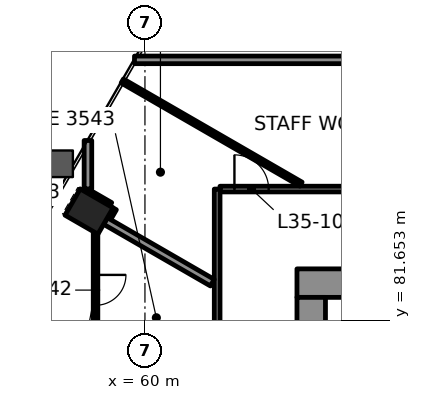
"""IFC4 building model, lengths in metres.
Left out: names, types, materials, properties, quantities, classifications, styles, units other than length and angle.
Written with IfcOpenShell. Run it as: python <this file> out.ifc"""

import sys

from ifc_helpers import new_model, si_unit, direction, frame, frame_2d, origin, origin_2d, place, context, subcontext, project, spatial, rectangle, hollow_rectangle, extrude, element, fill, save


model = new_model("IFC4")
c1 = context("Model", 3, precision=1e-05, world=origin(), true_north=direction((0.0, 1.0)))
c2 = subcontext(c1, "Body", "Model", "MODEL_VIEW")
j1 = project(units=[si_unit("LENGTHUNIT", "METRE"), si_unit("PLANEANGLEUNIT", "RADIAN")], contexts=[c1])
p1 = place(None, origin())
s1 = spatial("IfcSite", under=j1, at=p1, CompositionType="ELEMENT")
p2 = place(p1, origin())
s2 = spatial("IfcBuilding", under=s1, at=p2, CompositionType="ELEMENT")
p3 = place(p2, frame((0.0, 0.0, 155.8)))
s3 = spatial("IfcBuildingStorey", under=s2, at=p3, CompositionType="ELEMENT", Elevation=155.8)
p4 = place(p3, frame((58.53, 84.509, -0.0), z_axis=(0.0, 0.0, 1.0), x_axis=(-0.5, -0.866025403784, 0.0)))
e1 = element("IfcColumn", 1, at=p4, inside=s3, PredefinedType="COLUMN", context=c2, shape_type="SweptSolid", body=[
    extrude(hollow_rectangle(XDim=0.8, YDim=1.0, WallThickness=0.05, at=origin_2d()), origin(), (0.0, 0.0, 1.0), 3.9),
])
p5 = place(p3, frame((64.0, 82.625, 0.0), z_axis=(0.0, 0.0, 1.0), x_axis=(1.0, 0.0, 0.0)))
e2 = element("IfcWall", 2, at=p5, inside=s3, PredefinedType="SHEAR", context=c2, shape_type="SweptSolid", body=[
    extrude(rectangle(XDim=22.0, YDim=0.75, at=frame_2d((11.0, 0.0))), origin(), (0.0, 0.0, 1.0), 3.7),
])
p6 = place(p5, frame((3.695, 0.0, 0.0)))
e3 = element("IfcOpeningElement", 3, at=p6, cuts=e2, PredefinedType="OPENING", context=c2, shape_type="SweptSolid", body=[
    extrude(rectangle(XDim=1.0, YDim=2.1, at=frame_2d((0.5, 1.05))), frame((0.0, 0.385, 0.0), z_axis=(0.0, -1.0, 0.0), x_axis=(1.0, 0.0, 0.0)), (0.0, 0.0, 1.0), 0.77),
])
p7 = place(p5, frame((17.505, 0.0, 0.0)))
e4 = element("IfcOpeningElement", 4, at=p7, cuts=e2, PredefinedType="OPENING", context=c2, shape_type="SweptSolid", body=[
    extrude(rectangle(XDim=1.0, YDim=2.1, at=frame_2d((0.5, 1.05))), frame((0.0, 0.385, 0.0), z_axis=(0.0, -1.0, 0.0), x_axis=(1.0, 0.0, 0.0)), (0.0, 0.0, 1.0), 0.77),
])
p8 = place(p5, frame((10.65, 0.0, 0.0)))
e5 = element("IfcOpeningElement", 5, at=p8, cuts=e2, PredefinedType="OPENING", context=c2, shape_type="SweptSolid", body=[
    extrude(rectangle(XDim=0.9, YDim=2.1, at=frame_2d((0.45, 1.05))), frame((0.0, 0.385, 0.0), z_axis=(0.0, -1.0, 0.0), x_axis=(1.0, 0.0, 0.0)), (0.0, 0.0, 1.0), 0.77),
])
p9 = place(p3, frame((64.375, 67.75, 0.0), z_axis=(0.0, 0.0, 1.0), x_axis=(0.0, 1.0, 0.0)))
e6 = element("IfcWall", 6, at=p9, inside=s3, PredefinedType="SHEAR", context=c2, shape_type="SweptSolid", body=[
    extrude(rectangle(XDim=14.5, YDim=0.75, at=frame_2d((7.25, 0.0))), origin(), (0.0, 0.0, 1.0), 3.7),
])
p10 = place(p9, frame((4.65, 0.0, 0.0)))
e7 = element("IfcOpeningElement", 7, at=p10, cuts=e6, PredefinedType="OPENING", context=c2, shape_type="SweptSolid", body=[
    extrude(rectangle(XDim=1.8, YDim=2.1, at=frame_2d((0.9, 1.05))), frame((0.0, 0.385, 0.0), z_axis=(0.0, -1.0, 0.0), x_axis=(1.0, 0.0, 0.0)), (0.0, 0.0, 1.0), 0.77),
])
p11 = place(p9, frame((8.5, 0.0, 0.0)))
e8 = element("IfcOpeningElement", 8, at=p11, cuts=e6, PredefinedType="OPENING", context=c2, shape_type="SweptSolid", body=[
    extrude(rectangle(XDim=0.9, YDim=2.1, at=frame_2d((0.45, 1.05))), frame((0.0, 0.385, 0.0), z_axis=(0.0, -1.0, 0.0), x_axis=(1.0, 0.0, 0.0)), (0.0, 0.0, 1.0), 0.77),
])
p12 = place(p9, frame((12.2, 0.0, 0.0)))
e9 = element("IfcOpeningElement", 9, at=p12, cuts=e6, PredefinedType="OPENING", context=c2, shape_type="SweptSolid", body=[
    extrude(rectangle(XDim=0.9, YDim=2.1, at=frame_2d((0.45, 1.05))), frame((0.0, 0.385, 0.0), z_axis=(0.0, -1.0, 0.0), x_axis=(1.0, 0.0, 0.0)), (0.0, 0.0, 1.0), 0.77),
])
p13 = place(p3, frame((61.975, 85.1, 0.0), z_axis=(0.0, 0.0, 1.0), x_axis=(1.0, 0.0, 0.0)))
e10 = element("IfcWall", 10, at=p13, inside=s3, PredefinedType="PARTITIONING", context=c2, shape_type="SweptSolid", body=[
    extrude(rectangle(XDim=9.181, YDim=0.15, at=frame_2d((4.591, 0.0))), origin(), (0.0, 0.0, 1.0), 3.1),
])
p14 = place(p13, frame((0.38, 0.0, 0.0)))
e11 = element("IfcOpeningElement", 11, at=p14, cuts=e10, PredefinedType="OPENING", context=c2, shape_type="SweptSolid", body=[
    extrude(rectangle(XDim=0.9, YDim=2.1, at=frame_2d((0.45, 1.05))), frame((0.0, 0.085, 0.0), z_axis=(0.0, -1.0, 0.0), x_axis=(1.0, 0.0, 0.0)), (0.0, 0.0, 1.0), 0.17),
])
p15 = place(p13, frame((5.216, 0.0, 0.0)))
e12 = element("IfcOpeningElement", 12, at=p15, cuts=e10, PredefinedType="OPENING", context=c2, shape_type="SweptSolid", body=[
    extrude(rectangle(XDim=0.9, YDim=2.1, at=frame_2d((0.45, 1.05))), frame((0.0, 0.085, 0.0), z_axis=(0.0, -1.0, 0.0), x_axis=(1.0, 0.0, 0.0)), (0.0, 0.0, 1.0), 0.17),
])
p16 = place(p3, frame((59.725, 88.5, 0.0), z_axis=(0.0, 0.0, 1.0), x_axis=(1.0, 0.0, 0.0)))
e13 = element("IfcWall", 13, at=p16, inside=s3, PredefinedType="PARTITIONING", context=c2, shape_type="SweptSolid", body=[
    extrude(rectangle(XDim=5.542, YDim=0.2, at=frame_2d((2.771, 0.0))), origin(), (0.0, 0.0, 1.0), 2.865),
])
p17 = place(p3, frame((59.017, 84.355, 0.0), z_axis=(0.0, 0.0, 1.0), x_axis=(0.500038750527, 0.866003030001, 0.0)))
e14 = element("IfcWall", 14, at=p17, inside=s3, PredefinedType="PARTITIONING", context=c2, shape_type="SweptSolid", body=[
    extrude(rectangle(XDim=0.29, YDim=0.2, at=frame_2d((0.145, 0.0))), origin(), (0.0, 0.0, 1.0), 3.1),
])
p18 = place(p3, frame((61.9, 68.476, 0.0), z_axis=(0.0, 0.0, 1.0), x_axis=(0.0, 1.0, 0.0)))
e15 = element("IfcWall", 15, at=p18, inside=s3, PredefinedType="PARTITIONING", context=c2, shape_type="SweptSolid", body=[
    extrude(rectangle(XDim=16.624, YDim=0.15, at=frame_2d((8.312, 0.0))), origin(), (0.0, 0.0, 1.0), 3.1),
])
p19 = place(p18, frame((9.043, 0.0, 0.0)))
e16 = element("IfcOpeningElement", 16, at=p19, cuts=e15, PredefinedType="OPENING", context=c2, shape_type="SweptSolid", body=[
    extrude(rectangle(XDim=1.0, YDim=2.1, at=frame_2d((0.5, 1.05))), frame((0.0, 0.085, 0.0), z_axis=(0.0, -1.0, 0.0), x_axis=(1.0, 0.0, 0.0)), (0.0, 0.0, 1.0), 0.17),
])
p20 = place(p3, frame((58.7, 83.949, 0.0), z_axis=(0.0, 0.0, 1.0), x_axis=(0.0, -1.0, 0.0)))
e17 = element("IfcWall", 17, at=p20, inside=s3, PredefinedType="PARTITIONING", context=c2, shape_type="SweptSolid", body=[
    extrude(rectangle(XDim=3.015, YDim=0.12, at=frame_2d((1.508, 0.0))), origin(), (0.0, 0.0, 1.0), 3.1),
])
p21 = place(p20, frame((1.108, 0.0, 0.0)))
e18 = element("IfcOpeningElement", 18, at=p21, cuts=e17, PredefinedType="OPENING", context=c2, shape_type="SweptSolid", body=[
    extrude(rectangle(XDim=0.8, YDim=2.1, at=frame_2d((0.4, 1.05))), frame((0.0, 0.07, 0.0), z_axis=(0.0, -1.0, 0.0), x_axis=(1.0, 0.0, 0.0)), (0.0, 0.0, 1.0), 0.14),
])
p22 = place(p3, frame((58.5, 85.104, 0.0), z_axis=(0.0, 0.0, 1.0), x_axis=(0.0, 1.0, 0.0)))
e19 = element("IfcWall", 19, at=p22, inside=s3, PredefinedType="PARTITIONING", context=c2, shape_type="SweptSolid", body=[
    extrude(rectangle(XDim=1.274, YDim=0.2, at=frame_2d((0.637, 0.0))), origin(), (0.0, 0.0, 1.0), 3.1),
])
p23 = place(p3, frame((64.106, 85.23, 0.0), z_axis=(0.0, 0.0, 1.0), x_axis=(-0.866029080648, 0.499993631431, 0.0)))
e20 = element("IfcWall", 20, at=p23, inside=s3, PredefinedType="PARTITIONING", context=c2, shape_type="SweptSolid", body=[
    extrude(rectangle(XDim=5.429, YDim=0.12, at=frame_2d((2.715, 0.0))), origin(), (0.0, 0.0, 1.0), 2.865),
])
p24 = place(p3, frame((59.075, 84.656, 0.0), z_axis=(0.0, 0.0, 1.0), x_axis=(-0.866063163075, 0.499934593286, 0.0)))
e21 = element("IfcWall", 21, at=p24, inside=s3, PredefinedType="PARTITIONING", context=c2, shape_type="SweptSolid", body=[
    extrude(rectangle(XDim=0.664, YDim=0.2, at=frame_2d((0.332, 0.0))), origin(), (0.0, 0.0, 1.0), 2.865),
])
p25 = place(p3, frame((61.773, 82.637, 0.0), z_axis=(0.0, 0.0, 1.0), x_axis=(-0.866059071022, 0.4999416821, 0.0)))
e22 = element("IfcWall", 22, at=p25, inside=s3, PredefinedType="PARTITIONING", context=c2, shape_type="SweptSolid", body=[
    extrude(rectangle(XDim=3.246, YDim=0.2, at=frame_2d((1.623, 0.0))), origin(), (0.0, 0.0, 1.0), 3.1),
])
p26 = place(p14, origin())
e23 = element("IfcDoor", 23, at=p26, inside=s3, OperationType="SINGLE_SWING_RIGHT", PredefinedType="DOOR", context=c2, shape_type="SweptSolid", body=[
    extrude(rectangle(XDim=0.9, YDim=2.1, at=frame_2d((0.45, 1.05))), frame((0.0, 0.025, 0.0), z_axis=(0.0, -1.0, 0.0), x_axis=(1.0, 0.0, 0.0)), (0.0, 0.0, 1.0), 0.05),
])
fill(e11, e23)
p27 = place(p21, origin())
e24 = element("IfcDoor", 24, at=p27, inside=s3, OperationType="SINGLE_SWING_LEFT", PredefinedType="DOOR", context=c2, shape_type="SweptSolid", body=[
    extrude(rectangle(XDim=0.8, YDim=2.1, at=frame_2d((0.4, 1.05))), frame((0.0, 0.025, 0.0), z_axis=(0.0, -1.0, 0.0), x_axis=(1.0, 0.0, 0.0)), (0.0, 0.0, 1.0), 0.05),
])
fill(e18, e24)
save(model, sys.argv[1])
